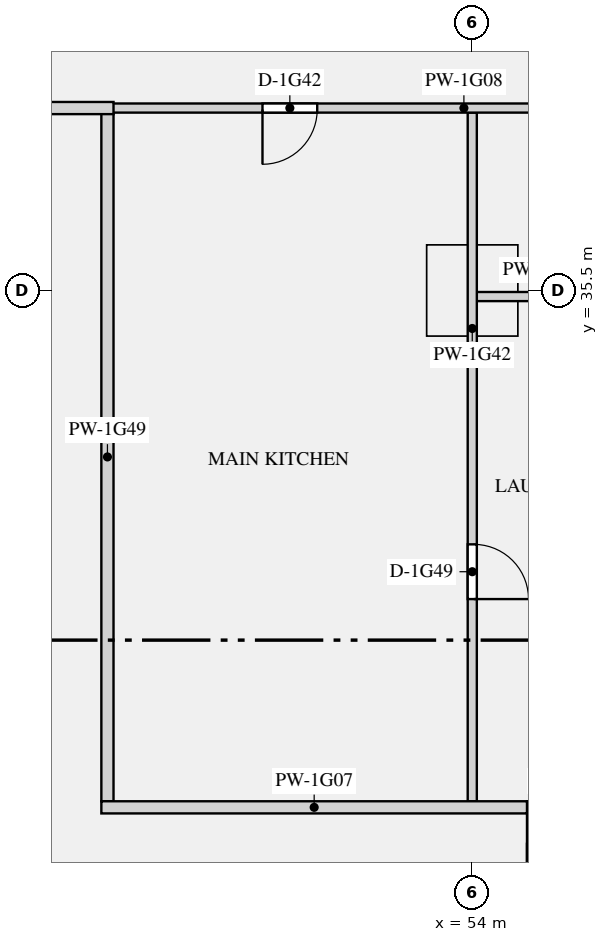
"""IFC4 building model, lengths in metres.
Left out: names, types, materials, properties, quantities, classifications, styles, units other than length and angle.
Written with IfcOpenShell. Run it as: python <this file> out.ifc"""

import sys

from ifc_helpers import new_model, si_unit, direction, frame, frame_2d, origin, origin_2d, place, context, subcontext, project, spatial, rectangle, extrude, element, fill, save


model = new_model("IFC4")
c1 = context("Model", 3, precision=1e-05, world=origin(), true_north=direction((0.0, 1.0)))
c2 = subcontext(c1, "Body", "Model", "MODEL_VIEW")
j1 = project(units=[si_unit("LENGTHUNIT", "METRE"), si_unit("PLANEANGLEUNIT", "RADIAN")], contexts=[c1])
p1 = place(None, origin())
s1 = spatial("IfcSite", under=j1, at=p1, CompositionType="ELEMENT")
p2 = place(p1, origin())
s2 = spatial("IfcBuilding", under=s1, at=p2, CompositionType="ELEMENT")
p3 = place(p2, frame((0.0, 0.0, 69.9)))
s3 = spatial("IfcBuildingStorey", under=s2, at=p3, CompositionType="ELEMENT", Elevation=69.9)
p4 = place(p3, frame((54.0, 35.5, 0.0), z_axis=(0.0, 0.0, 1.0), x_axis=(1.0, 0.0, 0.0)))
e1 = element("IfcColumn", 1, at=p4, inside=s3, PredefinedType="COLUMN", context=c2, shape_type="SweptSolid", body=[
    extrude(rectangle(XDim=1.5, YDim=1.5, at=origin_2d()), origin(), (0.0, 0.0, 1.0), 3.15),
])
p5 = place(p3, frame((54.9, 27.0, 0.0), z_axis=(0.0, 0.0, 1.0), x_axis=(1.0, 0.0, 0.0)))
e2 = element("IfcWall", 2, at=p5, inside=s3, PredefinedType="PARTITIONING", context=c2, shape_type="SweptSolid", body=[
    extrude(rectangle(XDim=1.3, YDim=0.2, at=frame_2d((0.65, 0.0))), origin(), (0.0, 0.0, 1.0), 2.65),
])
p6 = place(p3, frame((55.0, 23.1, 0.0), z_axis=(0.0, 0.0, 1.0), x_axis=(0.0, 1.0, 0.0)))
e3 = element("IfcWall", 3, at=p6, inside=s3, PredefinedType="PARTITIONING", context=c2, shape_type="SweptSolid", body=[
    extrude(rectangle(XDim=3.8, YDim=0.2, at=frame_2d((1.9, 0.0))), origin(), (0.0, 0.0, 1.0), 2.65),
])
p7 = place(p6, frame((2.1, 0.0, 0.0)))
e4 = element("IfcOpeningElement", 4, at=p7, cuts=e3, PredefinedType="OPENING", context=c2, shape_type="SweptSolid", body=[
    extrude(rectangle(XDim=1.2, YDim=2.1, at=frame_2d((0.6, 1.05))), frame((0.0, 0.11, 0.0), z_axis=(0.0, -1.0, 0.0), x_axis=(1.0, 0.0, 0.0)), (0.0, 0.0, 1.0), 0.22),
])
p8 = place(p3, frame((47.9, 27.0, 0.0), z_axis=(0.0, 0.0, 1.0), x_axis=(1.0, 0.0, 0.0)))
e5 = element("IfcWall", 5, at=p8, inside=s3, PredefinedType="PARTITIONING", context=c2, shape_type="SweptSolid", body=[
    extrude(rectangle(XDim=7.0, YDim=0.2, at=frame_2d((3.5, 0.0))), origin(), (0.0, 0.0, 1.0), 2.65),
])
p9 = place(p3, frame((47.9, 38.5, 0.0), z_axis=(0.0, 0.0, 1.0), x_axis=(1.0, 0.0, 0.0)))
e6 = element("IfcWall", 6, at=p9, inside=s3, PredefinedType="PARTITIONING", context=c2, shape_type="SweptSolid", body=[
    extrude(rectangle(XDim=8.375, YDim=0.15, at=frame_2d((4.188, 0.0))), origin(), (0.0, 0.0, 1.0), 2.65),
])
p10 = place(p9, frame((2.65, 0.0, 0.0)))
e7 = element("IfcOpeningElement", 7, at=p10, cuts=e6, PredefinedType="OPENING", context=c2, shape_type="SweptSolid", body=[
    extrude(rectangle(XDim=0.9, YDim=2.1, at=frame_2d((0.45, 1.05))), frame((0.0, 0.085, 0.0), z_axis=(0.0, -1.0, 0.0), x_axis=(1.0, 0.0, 0.0)), (0.0, 0.0, 1.0), 0.17),
])
p11 = place(p3, frame((23.925, 38.5, 0.0), z_axis=(0.0, 0.0, 1.0), x_axis=(1.0, 0.0, 0.0)))
e8 = element("IfcWall", 8, at=p11, inside=s3, PredefinedType="PARTITIONING", context=c2, shape_type="SweptSolid", body=[
    extrude(rectangle(XDim=24.175, YDim=0.2, at=frame_2d((12.087, 0.0))), origin(), (0.0, 0.0, 1.0), 2.65),
])
p12 = place(p11, frame((21.375, 0.0, 0.0)))
e9 = element("IfcOpeningElement", 9, at=p12, cuts=e8, PredefinedType="OPENING", context=c2, shape_type="SweptSolid", body=[
    extrude(rectangle(XDim=1.1, YDim=2.1, at=frame_2d((0.55, 1.05))), frame((0.0, 0.11, 0.0), z_axis=(0.0, -1.0, 0.0), x_axis=(1.0, 0.0, 0.0)), (0.0, 0.0, 1.0), 0.22),
])
p13 = place(p3, frame((54.075, 35.4, 0.0), z_axis=(0.0, 0.0, 1.0), x_axis=(1.0, 0.0, 0.0)))
e10 = element("IfcWall", 10, at=p13, inside=s3, PredefinedType="PARTITIONING", context=c2, shape_type="SweptSolid", body=[
    extrude(rectangle(XDim=2.125, YDim=0.15, at=frame_2d((1.062, 0.0))), origin(), (0.0, 0.0, 1.0), 2.65),
])
p14 = place(p3, frame((54.0, 27.1, 0.0), z_axis=(0.0, 0.0, 1.0), x_axis=(0.0, 1.0, 0.0)))
e11 = element("IfcWall", 11, at=p14, inside=s3, PredefinedType="PARTITIONING", context=c2, shape_type="SweptSolid", body=[
    extrude(rectangle(XDim=11.325, YDim=0.15, at=frame_2d((5.663, 0.0))), origin(), (0.0, 0.0, 1.0), 2.65),
])
p15 = place(p14, frame((3.325, 0.0, 0.0)))
e12 = element("IfcOpeningElement", 12, at=p15, cuts=e11, PredefinedType="OPENING", context=c2, shape_type="SweptSolid", body=[
    extrude(rectangle(XDim=0.9, YDim=2.1, at=frame_2d((0.45, 1.05))), frame((0.0, 0.085, 0.0), z_axis=(0.0, -1.0, 0.0), x_axis=(1.0, 0.0, 0.0)), (0.0, 0.0, 1.0), 0.17),
])
p16 = place(p3, frame((48.0, 27.1, 0.0), z_axis=(0.0, 0.0, 1.0), x_axis=(0.0, 1.0, 0.0)))
e13 = element("IfcWall", 13, at=p16, inside=s3, PredefinedType="PARTITIONING", context=c2, shape_type="SweptSolid", body=[
    extrude(rectangle(XDim=11.325, YDim=0.2, at=frame_2d((5.663, 0.0))), origin(), (0.0, 0.0, 1.0), 2.65),
])
p17 = place(p10, frame((0.9, 0.0, 0.0), z_axis=(0.0, 0.0, 1.0), x_axis=(-1.0, 0.0, 0.0)))
e14 = element("IfcDoor", 14, at=p17, inside=s3, OperationType="SINGLE_SWING_RIGHT", PredefinedType="DOOR", context=c2, shape_type="SweptSolid", body=[
    extrude(rectangle(XDim=0.9, YDim=2.1, at=frame_2d((0.45, 1.05))), frame((0.0, 0.025, 0.0), z_axis=(0.0, -1.0, 0.0), x_axis=(1.0, 0.0, 0.0)), (0.0, 0.0, 1.0), 0.05),
])
fill(e7, e14)
p18 = place(p15, frame((0.9, 0.0, 0.0), z_axis=(0.0, 0.0, 1.0), x_axis=(-1.0, 0.0, 0.0)))
e15 = element("IfcDoor", 15, at=p18, inside=s3, OperationType="SINGLE_SWING_RIGHT", PredefinedType="DOOR", context=c2, shape_type="SweptSolid", body=[
    extrude(rectangle(XDim=0.9, YDim=2.1, at=frame_2d((0.45, 1.05))), frame((0.0, 0.025, 0.0), z_axis=(0.0, -1.0, 0.0), x_axis=(1.0, 0.0, 0.0)), (0.0, 0.0, 1.0), 0.05),
])
fill(e12, e15)
save(model, sys.argv[1])
